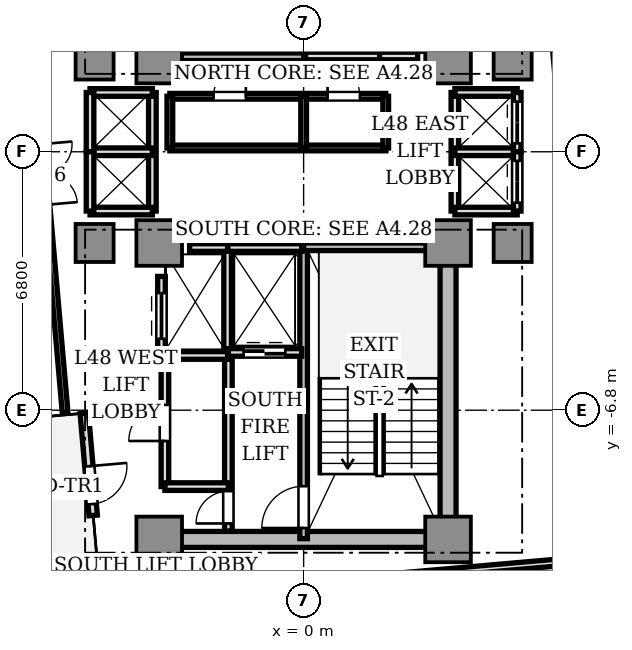
"""IFC4 building model, lengths in metres.
Left out: names, types, materials, properties, quantities, classifications, styles, units other than length and angle.
Written with IfcOpenShell. Run it as: python <this file> out.ifc"""

import sys

from ifc_helpers import new_model, si_unit, direction, frame, frame_2d, origin, origin_2d, place, context, subcontext, project, spatial, rectangle, extrude, source, transform, mapped, element, fill, save


model = new_model("IFC4")
c1 = context("Model", 3, precision=1e-05, world=origin(), true_north=direction((0.0, 1.0)))
c2 = subcontext(c1, "Body", "Model", "MODEL_VIEW")
j1 = project(units=[si_unit("LENGTHUNIT", "METRE"), si_unit("PLANEANGLEUNIT", "RADIAN")], contexts=[c1])
p1 = place(None, origin())
s1 = spatial("IfcSite", under=j1, at=p1, CompositionType="ELEMENT")
p2 = place(p1, origin())
s2 = spatial("IfcBuilding", under=s1, at=p2, CompositionType="ELEMENT")
p3 = place(p2, frame((0.0, 0.0, 175.2)))
s3 = spatial("IfcBuildingStorey", under=s2, at=p3, CompositionType="ELEMENT", Elevation=175.2)
p4 = place(p3, frame((-3.55, -10.2, 0.0), z_axis=(0.0, 0.0, 1.0), x_axis=(1.0, 0.0, 0.0)))
e1 = element("IfcWall", 1, at=p4, inside=s3, PredefinedType="SHEAR", context=c2, shape_type="SweptSolid", body=[
    extrude(rectangle(XDim=7.1, YDim=0.42, at=frame_2d((3.55, 0.0))), origin(), (0.0, 0.0, 1.0), 3.11),
])
p5 = place(p3, frame((3.8, -9.75, 0.0), z_axis=(0.0, 0.0, 1.0), x_axis=(0.0, 1.0, 0.0)))
e2 = element("IfcWall", 2, at=p5, inside=s3, PredefinedType="SHEAR", context=c2, shape_type="SweptSolid", body=[
    extrude(rectangle(XDim=6.9, YDim=0.42, at=frame_2d((3.45, 0.0))), origin(), (0.0, 0.0, 1.0), 3.11),
])
m1 = source(origin(), c2, "Body", "SweptSolid", [
    extrude(rectangle(XDim=1.2, YDim=1.2, at=origin_2d()), origin(), (0.0, 0.0, 1.0), 3.11),
])
for number, where, z_axis, x_axis in (
    (3, (-3.8, 2.4, 0.0), (0.0, 0.0, 1.0), (1.0, 0.0, 0.0)),
    (4, (3.8, 2.4, 0.0), (0.0, 0.0, 1.0), (1.0, 0.0, 0.0)),
    (5, (-3.8, -2.4, 0.0), (0.0, 0.0, 1.0), (1.0, 0.0, 0.0)),
    (6, (3.8, -2.4, 0.0), (0.0, 0.0, 1.0), (1.0, 0.0, 0.0)),
    (7, (-3.8, -10.2, 0.0), (0.0, 0.0, 1.0), (1.0, 0.0, 0.0)),
    (8, (3.8, -10.2, 0.0), (0.0, 0.0, 1.0), (1.0, 0.0, 0.0)),
):
    element("IfcColumn", number, at=place(p3, frame(where, z_axis=z_axis, x_axis=x_axis)), inside=s3, PredefinedType="COLUMN", context=c2, shape_type="MappedRepresentation", body=[
        mapped(m1, transform((0.0, 0.0, 0.0), scale=1.0)),
    ])
m2 = source(origin(), c2, "Body", "SweptSolid", [
    extrude(rectangle(XDim=1.0, YDim=1.0, at=origin_2d()), origin(), (0.0, 0.0, 1.0), 3.11),
])
for number, where, z_axis, x_axis in (
    (9, (5.5, 2.4, 0.0), (0.0, 0.0, 1.0), (1.0, 0.0, 0.0)),
    (10, (-5.5, 2.4, 0.0), (0.0, 0.0, 1.0), (1.0, 0.0, 0.0)),
    (11, (5.5, -2.4, 0.0), (0.0, 0.0, 1.0), (1.0, 0.0, 0.0)),
    (12, (-5.5, -2.4, 0.0), (0.0, 0.0, 1.0), (1.0, 0.0, 0.0)),
):
    element("IfcColumn", number, at=place(p3, frame(where, z_axis=z_axis, x_axis=x_axis)), inside=s3, PredefinedType="COLUMN", context=c2, shape_type="MappedRepresentation", body=[
        mapped(m2, transform((0.0, 0.0, 0.0), scale=1.0)),
    ])
p6 = place(p3, frame((-5.772, -6.879, 0.0), z_axis=(0.0, 0.0, 1.0), x_axis=(0.087168071984, -0.996193619346, 0.0)))
e13 = element("IfcWall", 13, at=p6, inside=s3, PredefinedType="STANDARD", context=c2, shape_type="SweptSolid", body=[
    extrude(rectangle(XDim=2.7, YDim=0.22, at=frame_2d((1.35, 0.0))), origin(), (0.0, 0.0, 1.0), 3.11),
])
p7 = place(p6, frame((1.4, 0.0, 0.0)))
e14 = element("IfcOpeningElement", 14, at=p7, cuts=e13, PredefinedType="OPENING", context=c2, shape_type="SweptSolid", body=[
    extrude(rectangle(XDim=1.0, YDim=2.2, at=frame_2d((0.5, 1.1))), frame((0.0, 0.12, 0.0), z_axis=(0.0, -1.0, 0.0), x_axis=(1.0, 0.0, 0.0)), (0.0, 0.0, 1.0), 0.24),
])
p8 = place(p3, frame((0.0, 2.5, 0.0), z_axis=(0.0, 0.0, 1.0), x_axis=(0.0, 1.0, 0.0)))
e15 = element("IfcWall", 15, at=p8, inside=s3, PredefinedType="SOLIDWALL", context=c2, shape_type="SweptSolid", body=[
    extrude(rectangle(XDim=7.68, YDim=0.2, at=frame_2d((3.84, 0.0))), origin(), (0.0, 0.0, 1.0), 3.11),
])
p9 = place(p8, frame((6.36, 0.0, 0.0)))
e16 = element("IfcOpeningElement", 16, at=p9, cuts=e15, PredefinedType="OPENING", context=c2, shape_type="SweptSolid", body=[
    extrude(rectangle(XDim=1.1, YDim=2.15, at=frame_2d((0.55, 1.075))), frame((0.0, 0.11, 0.0), z_axis=(0.0, -1.0, 0.0), x_axis=(1.0, 0.0, 0.0)), (0.0, 0.0, 1.0), 0.22),
])
p10 = place(p3, frame((-3.72, 2.5, 0.0), z_axis=(0.0, 0.0, 1.0), x_axis=(1.0, 0.0, 0.0)))
e17 = element("IfcWall", 17, at=p10, inside=s3, PredefinedType="SOLIDWALL", context=c2, shape_type="SweptSolid", body=[
    extrude(rectangle(XDim=3.72, YDim=0.2, at=frame_2d((1.86, 0.0))), origin(), (0.0, 0.0, 1.0), 3.11),
])
p11 = place(p3, frame((0.0, -10.18, 0.0), z_axis=(0.0, 0.0, 1.0), x_axis=(0.0, 1.0, 0.0)))
e18 = element("IfcWall", 18, at=p11, inside=s3, PredefinedType="SOLIDWALL", context=c2, shape_type="SweptSolid", body=[
    extrude(rectangle(XDim=7.68, YDim=0.2, at=frame_2d((3.84, 0.0))), origin(), (0.0, 0.0, 1.0), 3.11),
])
p12 = place(p11, frame((0.28, 0.0, 0.0)))
e19 = element("IfcOpeningElement", 19, at=p12, cuts=e18, PredefinedType="OPENING", context=c2, shape_type="SweptSolid", body=[
    extrude(rectangle(XDim=1.1, YDim=2.15, at=frame_2d((0.55, 1.075))), frame((0.0, 0.11, 0.0), z_axis=(0.0, -1.0, 0.0), x_axis=(1.0, 0.0, 0.0)), (0.0, 0.0, 1.0), 0.22),
])
p13 = place(p3, frame((0.0, -2.5, 0.0), z_axis=(0.0, 0.0, 1.0), x_axis=(1.0, 0.0, 0.0)))
e20 = element("IfcWall", 20, at=p13, inside=s3, PredefinedType="SOLIDWALL", context=c2, shape_type="SweptSolid", body=[
    extrude(rectangle(XDim=3.72, YDim=0.2, at=frame_2d((1.86, 0.0))), origin(), (0.0, 0.0, 1.0), 3.11),
])
p14 = place(p3, frame((-1.98, -9.98, 0.0), z_axis=(0.0, 0.0, 1.0), x_axis=(0.0, 1.0, 0.0)))
e21 = element("IfcWall", 21, at=p14, inside=s3, PredefinedType="SOLIDWALL", context=c2, shape_type="SweptSolid", body=[
    extrude(rectangle(XDim=4.66, YDim=0.2, at=frame_2d((2.33, 0.0))), origin(), (0.0, 0.0, 1.0), 2.66),
])
p15 = place(p14, frame((0.2, 0.0, 0.0)))
e22 = element("IfcOpeningElement", 22, at=p15, cuts=e21, PredefinedType="OPENING", context=c2, shape_type="SweptSolid", body=[
    extrude(rectangle(XDim=0.85, YDim=2.1, at=frame_2d((0.425, 1.05))), frame((0.0, 0.11, 0.0), z_axis=(0.0, -1.0, 0.0), x_axis=(1.0, 0.0, 0.0)), (0.0, 0.0, 1.0), 0.22),
])
p16 = place(p3, frame((2.0, 2.5, 0.0), z_axis=(0.0, 0.0, 1.0), x_axis=(0.0, 1.0, 0.0)))
e23 = element("IfcWall", 23, at=p16, inside=s3, PredefinedType="SOLIDWALL", context=c2, shape_type="SweptSolid", body=[
    extrude(rectangle(XDim=2.78, YDim=0.2, at=frame_2d((1.39, 0.0))), origin(), (0.0, 0.0, 1.0), 2.66),
])
p17 = place(p3, frame((0.05, 2.52, 0.0), z_axis=(0.0, 0.0, 1.0), x_axis=(1.0, 0.0, 0.0)))
e24 = element("IfcWall", 24, at=p17, inside=s3, PredefinedType="SOLIDWALL", context=c2, shape_type="SweptSolid", body=[
    extrude(rectangle(XDim=1.95, YDim=0.2, at=frame_2d((0.975, 0.0))), origin(), (0.0, 0.0, 1.0), 2.66),
])
p18 = place(p3, frame((-2.0, -5.28, 0.0), z_axis=(0.0, 0.0, 1.0), x_axis=(0.0, 1.0, 0.0)))
e25 = element("IfcWall", 25, at=p18, inside=s3, PredefinedType="SOLIDWALL", context=c2, shape_type="SweptSolid", body=[
    extrude(rectangle(XDim=2.78, YDim=0.2, at=frame_2d((1.39, 0.0))), origin(), (0.0, 0.0, 1.0), 2.66),
])
p19 = place(p3, frame((-2.0, -2.52, 0.0), z_axis=(0.0, 0.0, 1.0), x_axis=(1.0, 0.0, 0.0)))
e26 = element("IfcWall", 26, at=p19, inside=s3, PredefinedType="SOLIDWALL", context=c2, shape_type="SweptSolid", body=[
    extrude(rectangle(XDim=1.95, YDim=0.2, at=frame_2d((0.975, 0.0))), origin(), (0.0, 0.0, 1.0), 2.66),
])
p20 = place(p3, frame((-1.98, -5.28, 0.0), z_axis=(0.0, 0.0, 1.0), x_axis=(1.0, 0.0, 0.0)))
e27 = element("IfcWall", 27, at=p20, inside=s3, PredefinedType="SOLIDWALL", context=c2, shape_type="SweptSolid", body=[
    extrude(rectangle(XDim=1.93, YDim=0.2, at=frame_2d((0.965, 0.0))), origin(), (0.0, 0.0, 1.0), 2.66),
])
p21 = place(p20, frame((0.4, 0.0, 0.0)))
e28 = element("IfcOpeningElement", 28, at=p21, cuts=e27, PredefinedType="OPENING", context=c2, shape_type="SweptSolid", body=[
    extrude(rectangle(XDim=1.1, YDim=2.2, at=frame_2d((0.55, 1.1))), frame((0.0, 0.11, 0.0), z_axis=(0.0, -1.0, 0.0), x_axis=(1.0, 0.0, 0.0)), (0.0, 0.0, 1.0), 0.22),
])
for number, where, z_axis, x_axis in (
    (29, (2.0, 2.52, 0.0), (0.0, 0.0, 1.0), (1.0, 0.0, 0.0)),
    (30, (-3.0, -2.52, 0.0), (0.0, 0.0, 1.0), (1.0, 0.0, 0.0)),
):
    element("IfcWall", number, at=place(p3, frame(where, z_axis=z_axis, x_axis=x_axis)), inside=s3, PredefinedType="SOLIDWALL", context=c2, shape_type="SweptSolid", body=[
        extrude(rectangle(XDim=1.0, YDim=0.2, at=frame_2d((0.5, 0.0))), origin(), (0.0, 0.0, 1.0), 2.66),
    ])
p22 = place(p3, frame((-3.74, -5.36, 0.0), z_axis=(0.0, 0.0, 1.0), x_axis=(1.0, 0.0, 0.0)))
e31 = element("IfcWall", 31, at=p22, inside=s3, PredefinedType="SOLIDWALL", context=c2, shape_type="SweptSolid", body=[
    extrude(rectangle(XDim=1.74, YDim=0.2, at=frame_2d((0.87, 0.0))), origin(), (0.0, 0.0, 1.0), 2.66),
])
p23 = place(p3, frame((-3.74, -5.36, 0.0), z_axis=(0.0, 0.0, 1.0), x_axis=(0.0, 1.0, 0.0)))
e32 = element("IfcWall", 32, at=p23, inside=s3, PredefinedType="SOLIDWALL", context=c2, shape_type="SweptSolid", body=[
    extrude(rectangle(XDim=2.08, YDim=0.2, at=frame_2d((1.04, 0.0))), origin(), (0.0, 0.0, 1.0), 2.66),
])
p24 = place(p23, frame((0.44, 0.0, 0.0)))
e33 = element("IfcOpeningElement", 33, at=p24, cuts=e32, PredefinedType="OPENING", context=c2, shape_type="SweptSolid", body=[
    extrude(rectangle(XDim=1.2, YDim=2.2, at=frame_2d((0.6, 1.1))), frame((0.0, 0.11, 0.0), z_axis=(0.0, -1.0, 0.0), x_axis=(1.0, 0.0, 0.0)), (0.0, 0.0, 1.0), 0.22),
])
p25 = place(p3, frame((3.98, -1.56, 0.0), z_axis=(0.0, 0.0, 1.0), x_axis=(0.0, 1.0, 0.0)))
e34 = element("IfcWall", 34, at=p25, inside=s3, PredefinedType="SOLIDWALL", context=c2, shape_type="SweptSolid", body=[
    extrude(rectangle(XDim=3.12, YDim=0.2, at=frame_2d((1.56, 0.0))), origin(), (0.0, 0.0, 1.0), 2.28),
])
for number, where, z_axis, x_axis in (
    (35, (3.98, 1.56, 0.0), (0.0, 0.0, 1.0), (1.0, 0.0, 0.0)),
    (36, (3.98, -1.56, 0.0), (0.0, 0.0, 1.0), (1.0, 0.0, 0.0)),
    (37, (3.98, 0.0, 0.0), (0.0, 0.0, 1.0), (1.0, 0.0, 0.0)),
):
    element("IfcWall", number, at=place(p3, frame(where, z_axis=z_axis, x_axis=x_axis)), inside=s3, PredefinedType="SOLIDWALL", context=c2, shape_type="SweptSolid", body=[
        extrude(rectangle(XDim=1.64, YDim=0.2, at=frame_2d((0.82, 0.0))), origin(), (0.0, 0.0, 1.0), 2.66),
    ])
p26 = place(p3, frame((5.62, 0.0, 0.0), z_axis=(0.0, 0.0, 1.0), x_axis=(0.0, 1.0, 0.0)))
e38 = element("IfcWall", 38, at=p26, inside=s3, PredefinedType="SOLIDWALL", context=c2, shape_type="SweptSolid", body=[
    extrude(rectangle(XDim=1.56, YDim=0.2, at=frame_2d((0.78, 0.0))), origin(), (0.0, 0.0, 1.0), 2.66),
])
p27 = place(p26, frame((0.22, 0.0, 0.0)))
e39 = element("IfcOpeningElement", 39, at=p27, cuts=e38, PredefinedType="OPENING", context=c2, shape_type="SweptSolid", body=[
    extrude(rectangle(XDim=1.1, YDim=2.2, at=frame_2d((0.55, 1.1))), frame((0.0, 0.11, 0.0), z_axis=(0.0, -1.0, 0.0), x_axis=(1.0, 0.0, 0.0)), (0.0, 0.0, 1.0), 0.22),
])
p28 = place(p3, frame((5.62, -1.56, 0.0), z_axis=(0.0, 0.0, 1.0), x_axis=(0.0, 1.0, 0.0)))
e40 = element("IfcWall", 40, at=p28, inside=s3, PredefinedType="SOLIDWALL", context=c2, shape_type="SweptSolid", body=[
    extrude(rectangle(XDim=1.56, YDim=0.2, at=frame_2d((0.78, 0.0))), origin(), (0.0, 0.0, 1.0), 2.66),
])
p29 = place(p28, frame((0.22, 0.0, 0.0)))
e41 = element("IfcOpeningElement", 41, at=p29, cuts=e40, PredefinedType="OPENING", context=c2, shape_type="SweptSolid", body=[
    extrude(rectangle(XDim=1.1, YDim=2.2, at=frame_2d((0.55, 1.1))), frame((0.0, 0.11, 0.0), z_axis=(0.0, -1.0, 0.0), x_axis=(1.0, 0.0, 0.0)), (0.0, 0.0, 1.0), 0.22),
])
p30 = place(p3, frame((-3.98, -1.56, 0.0), z_axis=(0.0, 0.0, 1.0), x_axis=(0.0, 1.0, 0.0)))
e42 = element("IfcWall", 42, at=p30, inside=s3, PredefinedType="SOLIDWALL", context=c2, shape_type="SweptSolid", body=[
    extrude(rectangle(XDim=3.12, YDim=0.2, at=frame_2d((1.56, 0.0))), origin(), (0.0, 0.0, 1.0), 2.28),
])
for number, where, z_axis, x_axis in (
    (43, (-5.62, 1.56, 0.0), (0.0, 0.0, 1.0), (1.0, 0.0, 0.0)),
    (44, (-5.62, -1.56, 0.0), (0.0, 0.0, 1.0), (1.0, 0.0, 0.0)),
    (45, (-5.62, 0.0, 0.0), (0.0, 0.0, 1.0), (1.0, 0.0, 0.0)),
):
    element("IfcWall", number, at=place(p3, frame(where, z_axis=z_axis, x_axis=x_axis)), inside=s3, PredefinedType="SOLIDWALL", context=c2, shape_type="SweptSolid", body=[
        extrude(rectangle(XDim=1.64, YDim=0.2, at=frame_2d((0.82, 0.0))), origin(), (0.0, 0.0, 1.0), 2.66),
    ])
for number, where, z_axis, x_axis in (
    (46, (-5.62, 0.0, 0.0), (0.0, 0.0, 1.0), (0.0, 1.0, 0.0)),
    (47, (-5.62, -1.56, 0.0), (0.0, 0.0, 1.0), (0.0, 1.0, 0.0)),
):
    element("IfcWall", number, at=place(p3, frame(where, z_axis=z_axis, x_axis=x_axis)), inside=s3, PredefinedType="SOLIDWALL", context=c2, shape_type="SweptSolid", body=[
        extrude(rectangle(XDim=1.56, YDim=0.2, at=frame_2d((0.78, 0.0))), origin(), (0.0, 0.0, 1.0), 2.66),
    ])
p31 = place(p3, frame((-3.65, -8.81, 0.0), z_axis=(0.0, 0.0, 1.0), x_axis=(0.0, 1.0, 0.0)))
e48 = element("IfcWall", 48, at=p31, inside=s3, PredefinedType="SOLIDWALL", context=c2, shape_type="SweptSolid", body=[
    extrude(rectangle(XDim=3.43, YDim=0.2, at=frame_2d((1.715, 0.0))), origin(), (0.0, 0.0, 1.0), 2.66),
])
p32 = place(p31, frame((1.2, 0.0, 0.0)))
e49 = element("IfcOpeningElement", 49, at=p32, cuts=e48, PredefinedType="OPENING", context=c2, shape_type="SweptSolid", body=[
    extrude(rectangle(XDim=0.95, YDim=2.15, at=frame_2d((0.475, 1.075))), frame((0.0, 0.11, 0.0), z_axis=(0.0, -1.0, 0.0), x_axis=(1.0, 0.0, 0.0)), (0.0, 0.0, 1.0), 0.22),
])
p33 = place(p3, frame((-3.65, -8.81, 0.0), z_axis=(0.0, 0.0, 1.0), x_axis=(1.0, 0.0, 0.0)))
e50 = element("IfcWall", 50, at=p33, inside=s3, PredefinedType="SOLIDWALL", context=c2, shape_type="SweptSolid", body=[
    extrude(rectangle(XDim=1.67, YDim=0.2, at=frame_2d((0.835, 0.0))), origin(), (0.0, 0.0, 1.0), 2.66),
])
p34 = place(p3, frame((-3.52, 0.1, 0.0), z_axis=(0.0, 0.0, 1.0), x_axis=(1.0, 0.0, 0.0)))
e51 = element("IfcWall", 51, at=p34, inside=s3, PredefinedType="PARTITIONING", context=c2, shape_type="SweptSolid", body=[
    extrude(rectangle(XDim=5.68, YDim=0.15, at=frame_2d((2.84, 0.0))), origin(), (0.0, 0.0, 1.0), 2.66),
])
p35 = place(p3, frame((-3.52, 1.46, 0.0), z_axis=(0.0, 0.0, 1.0), x_axis=(1.0, 0.0, 0.0)))
e52 = element("IfcWall", 52, at=p35, inside=s3, PredefinedType="PARTITIONING", context=c2, shape_type="SweptSolid", body=[
    extrude(rectangle(XDim=5.68, YDim=0.15, at=frame_2d((2.84, 0.0))), origin(), (0.0, 0.0, 1.0), 2.66),
])
p36 = place(p35, frame((1.15, 0.0, 0.0)))
e53 = element("IfcOpeningElement", 53, at=p36, cuts=e52, PredefinedType="OPENING", context=c2, shape_type="SweptSolid", body=[
    extrude(rectangle(XDim=0.85, YDim=2.1, at=frame_2d((0.425, 1.05))), frame((0.0, 0.085, 0.0), z_axis=(0.0, -1.0, 0.0), x_axis=(1.0, 0.0, 0.0)), (0.0, 0.0, 1.0), 0.17),
])
p37 = place(p35, frame((4.15, 0.0, 0.0)))
e54 = element("IfcOpeningElement", 54, at=p37, cuts=e52, PredefinedType="OPENING", context=c2, shape_type="SweptSolid", body=[
    extrude(rectangle(XDim=0.85, YDim=2.1, at=frame_2d((0.425, 1.05))), frame((0.0, 0.085, 0.0), z_axis=(0.0, -1.0, 0.0), x_axis=(1.0, 0.0, 0.0)), (0.0, 0.0, 1.0), 0.17),
])
p38 = place(p3, frame((-3.52, 0.1, 0.0), z_axis=(0.0, 0.0, 1.0), x_axis=(0.0, 1.0, 0.0)))
e55 = element("IfcWall", 55, at=p38, inside=s3, PredefinedType="PARTITIONING", context=c2, shape_type="SweptSolid", body=[
    extrude(rectangle(XDim=1.36, YDim=0.15, at=frame_2d((0.68, 0.0))), origin(), (0.0, 0.0, 1.0), 2.28),
])
for number, where, z_axis, x_axis in (
    (56, (2.16, 0.1, 0.0), (0.0, 0.0, 1.0), (0.0, 1.0, 0.0)),
    (57, (0.0, 0.1, 0.0), (0.0, 0.0, 1.0), (0.0, 1.0, 0.0)),
):
    element("IfcWall", number, at=place(p3, frame(where, z_axis=z_axis, x_axis=x_axis)), inside=s3, PredefinedType="PARTITIONING", context=c2, shape_type="SweptSolid", body=[
        extrude(rectangle(XDim=1.36, YDim=0.15, at=frame_2d((0.68, 0.0))), origin(), (0.0, 0.0, 1.0), 2.66),
    ])
p39 = place(p3, frame((7.373, -5.679, 0.0), z_axis=(0.0, 0.0, 1.0), x_axis=(-0.087163455754, 0.996194023261, 0.0)))
e58 = element("IfcWall", 58, at=p39, inside=s3, PredefinedType="PARTITIONING", context=c2, shape_type="SweptSolid", body=[
    extrude(rectangle(XDim=10.4, YDim=0.18, at=frame_2d((5.2, 0.0))), origin(), (0.0, 0.0, 1.0), 2.66),
])
p40 = place(p3, frame((-7.373, 5.679, 0.0), z_axis=(0.0, 0.0, 1.0), x_axis=(0.087154691724, -0.996194790044, 0.0)))
e59 = element("IfcWall", 59, at=p40, inside=s3, PredefinedType="PARTITIONING", context=c2, shape_type="SweptSolid", body=[
    extrude(rectangle(XDim=12.6, YDim=0.15, at=frame_2d((6.3, 0.0))), origin(), (0.0, 0.0, 1.0), 2.66),
])
p41 = place(p40, frame((5.5, 0.0, 0.0)))
e60 = element("IfcOpeningElement", 60, at=p41, cuts=e59, PredefinedType="OPENING", context=c2, shape_type="SweptSolid", body=[
    extrude(rectangle(XDim=1.6, YDim=2.25, at=frame_2d((0.8, 1.125))), frame((0.0, 0.085, 0.0), z_axis=(0.0, -1.0, 0.0), x_axis=(1.0, 0.0, 0.0)), (0.0, 0.0, 1.0), 0.17),
])
p42 = place(p3, frame((1.936, -11.224, 0.0), z_axis=(0.0, 0.0, 1.0), x_axis=(0.996194212812, 0.087161289348, 0.0)))
e61 = element("IfcWall", 61, at=p42, inside=s3, PredefinedType="PARTITIONING", context=c2, shape_type="SweptSolid", body=[
    extrude(rectangle(XDim=5.35, YDim=0.18, at=frame_2d((2.675, 0.0))), origin(), (0.0, 0.0, 1.0), 2.66),
])
m3 = source(origin(), c2, "Body", "SweptSolid", [
    extrude(rectangle(XDim=1.0, YDim=0.05, at=origin_2d()), origin(), (0.0, 0.0, 1.0), 2.2),
])
p43 = place(p7, frame((0.5, 0.0, 0.0)))
e62 = element("IfcDoor", 62, at=p43, inside=s3, OperationType="SINGLE_SWING_LEFT", PredefinedType="DOOR", context=c2, shape_type="MappedRepresentation", body=[
    mapped(m3, transform((0.0, 0.0, 0.0), scale=1.0)),
])
fill(e14, e62)
m4 = source(origin(), c2, "Body", "SweptSolid", [
    extrude(rectangle(XDim=1.1, YDim=0.05, at=origin_2d()), origin(), (0.0, 0.0, 1.0), 2.15),
])
p44 = place(p12, frame((0.55, 0.0, 0.0)))
e63 = element("IfcDoor", 63, at=p44, inside=s3, OperationType="SINGLE_SWING_LEFT", PredefinedType="DOOR", context=c2, shape_type="MappedRepresentation", body=[
    mapped(m4, transform((0.0, 0.0, 0.0), scale=1.0)),
])
fill(e19, e63)
m5 = source(origin(), c2, "Body", "SweptSolid", [
    extrude(rectangle(XDim=0.85, YDim=0.05, at=origin_2d()), origin(), (0.0, 0.0, 1.0), 2.1),
])
p45 = place(p15, frame((0.425, 0.0, 0.0)))
e64 = element("IfcDoor", 64, at=p45, inside=s3, OperationType="SINGLE_SWING_LEFT", PredefinedType="DOOR", context=c2, shape_type="MappedRepresentation", body=[
    mapped(m5, transform((0.0, 0.0, 0.0), scale=1.0)),
])
fill(e22, e64)
m6 = source(origin(), c2, "Body", "SweptSolid", [
    extrude(rectangle(XDim=1.1, YDim=0.05, at=origin_2d()), origin(), (0.0, 0.0, 1.0), 2.2),
])
p46 = place(p21, frame((0.55, 0.0, 0.0)))
e65 = element("IfcDoor", 65, at=p46, inside=s3, OperationType="DOUBLE_DOOR_SLIDING", PredefinedType="DOOR", context=c2, shape_type="MappedRepresentation", body=[
    mapped(m6, transform((0.0, 0.0, 0.0), scale=1.0)),
])
fill(e28, e65)
m7 = source(origin(), c2, "Body", "SweptSolid", [
    extrude(rectangle(XDim=1.2, YDim=0.05, at=origin_2d()), origin(), (0.0, 0.0, 1.0), 2.2),
])
p47 = place(p24, frame((0.6, 0.0, 0.0)))
e66 = element("IfcDoor", 66, at=p47, inside=s3, OperationType="DOUBLE_DOOR_SLIDING", PredefinedType="DOOR", context=c2, shape_type="MappedRepresentation", body=[
    mapped(m7, transform((0.0, 0.0, 0.0), scale=1.0)),
])
fill(e33, e66)
p48 = place(p27, frame((0.55, 0.0, 0.0)))
e67 = element("IfcDoor", 67, at=p48, inside=s3, OperationType="DOUBLE_DOOR_SLIDING", PredefinedType="DOOR", context=c2, shape_type="MappedRepresentation", body=[
    mapped(m6, transform((0.0, 0.0, 0.0), scale=1.0)),
])
fill(e39, e67)
p49 = place(p29, frame((0.55, 0.0, 0.0)))
e68 = element("IfcDoor", 68, at=p49, inside=s3, OperationType="DOUBLE_DOOR_SLIDING", PredefinedType="DOOR", context=c2, shape_type="MappedRepresentation", body=[
    mapped(m6, transform((0.0, 0.0, 0.0), scale=1.0)),
])
fill(e41, e68)
m8 = source(origin(), c2, "Body", "SweptSolid", [
    extrude(rectangle(XDim=0.95, YDim=0.05, at=origin_2d()), origin(), (0.0, 0.0, 1.0), 2.15),
])
p50 = place(p32, frame((0.475, 0.0, 0.0)))
e69 = element("IfcDoor", 69, at=p50, inside=s3, OperationType="SINGLE_SWING_LEFT", PredefinedType="DOOR", context=c2, shape_type="MappedRepresentation", body=[
    mapped(m8, transform((0.0, 0.0, 0.0), scale=1.0)),
])
fill(e49, e69)
p51 = place(p36, frame((0.425, 0.0, 0.0)))
e70 = element("IfcDoor", 70, at=p51, inside=s3, OperationType="SINGLE_SWING_RIGHT", PredefinedType="DOOR", context=c2, shape_type="MappedRepresentation", body=[
    mapped(m5, transform((0.0, 0.0, 0.0), scale=1.0)),
])
fill(e53, e70)
p52 = place(p37, frame((0.425, 0.0, 0.0)))
e71 = element("IfcDoor", 71, at=p52, inside=s3, OperationType="SINGLE_SWING_LEFT", PredefinedType="DOOR", context=c2, shape_type="MappedRepresentation", body=[
    mapped(m5, transform((0.0, 0.0, 0.0), scale=1.0)),
])
fill(e54, e71)
save(model, sys.argv[1])
